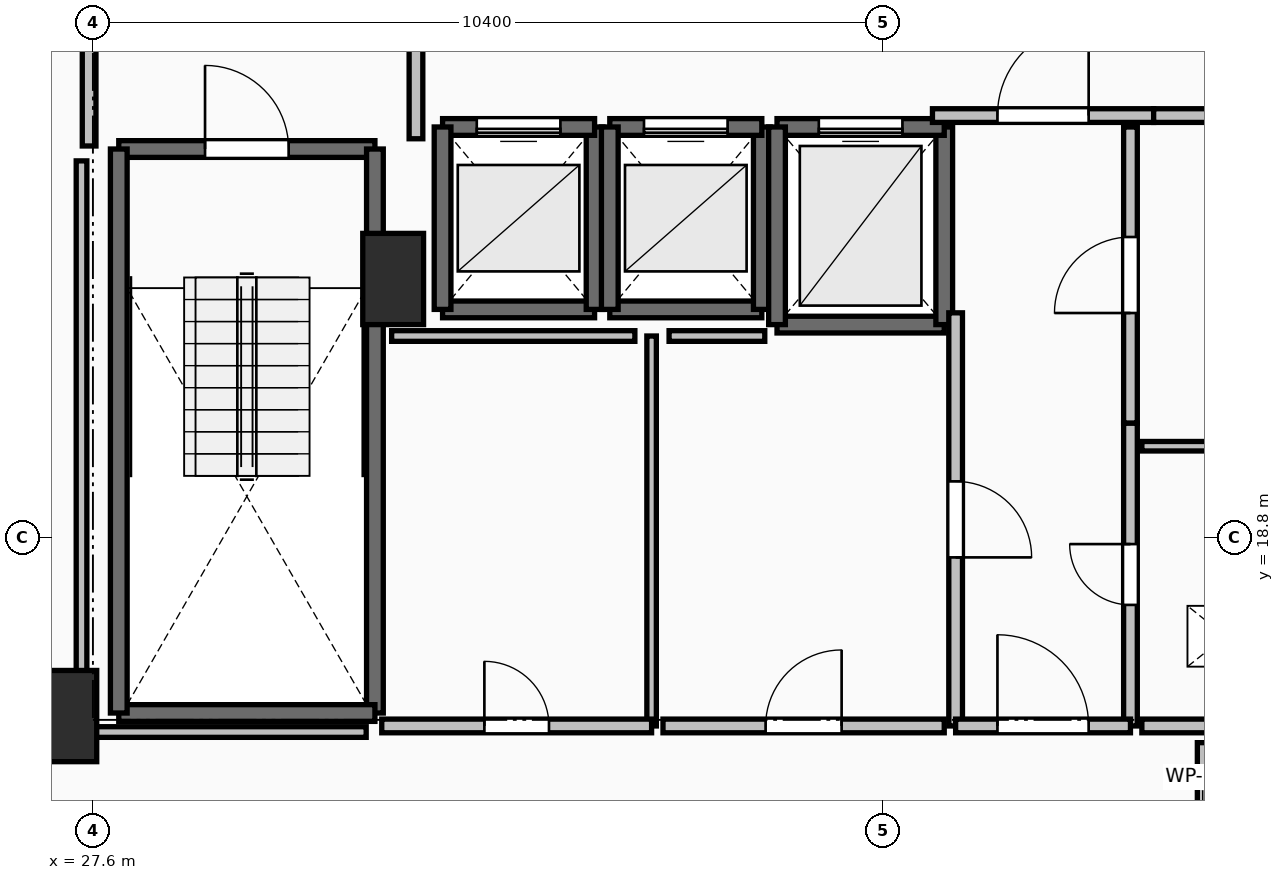
"""IFC4 building model, lengths in metres.
Left out: names, types, materials, properties, quantities, classifications, styles, units other than length and angle.
Written with IfcOpenShell. Run it as: python <this file> out.ifc"""

import sys

from ifc_helpers import new_model, si_unit, direction, frame, frame_2d, origin, origin_2d, place, context, subcontext, project, spatial, rectangle, extrude, element, fill, save


model = new_model("IFC4")
c1 = context("Model", 3, precision=1e-05, world=origin(), true_north=direction((0.0, 1.0)))
c2 = subcontext(c1, "Body", "Model", "MODEL_VIEW")
j1 = project(units=[si_unit("LENGTHUNIT", "METRE"), si_unit("PLANEANGLEUNIT", "RADIAN")], contexts=[c1])
p1 = place(None, origin())
s1 = spatial("IfcSite", under=j1, at=p1, CompositionType="ELEMENT")
p2 = place(p1, origin())
s2 = spatial("IfcBuilding", under=s1, at=p2, CompositionType="ELEMENT")
p3 = place(p2, frame((0.0, 0.0, 160.6)))
s3 = spatial("IfcBuildingStorey", under=s2, at=p3, CompositionType="ELEMENT", Elevation=160.6)
for number, where, z_axis, x_axis in (
    (1, (27.25, 16.45, 0.0), (0.0, 0.0, 1.0), (1.0, 0.0, 0.0)),
    (2, (31.55, 22.2, 0.0), (0.0, 0.0, 1.0), (1.0, 0.0, 0.0)),
):
    element("IfcColumn", number, at=place(p3, frame(where, z_axis=z_axis, x_axis=x_axis)), inside=s3, PredefinedType="PILASTER", context=c2, shape_type="SweptSolid", body=[
        extrude(rectangle(XDim=0.8, YDim=1.2, at=origin_2d()), origin(), (0.0, 0.0, 1.0), 3.5),
    ])
p4 = place(p3, frame((27.94, 23.91, 0.0), z_axis=(0.0, 0.0, 1.0), x_axis=(1.0, 0.0, 0.0)))
e3 = element("IfcWall", 3, at=p4, inside=s3, PredefinedType="SOLIDWALL", context=c2, shape_type="SweptSolid", body=[
    extrude(rectangle(XDim=3.37, YDim=0.22, at=frame_2d((1.685, 0.0))), origin(), (0.0, 0.0, 1.0), 3.24),
])
p5 = place(p4, frame((1.135, 0.0, 0.0)))
e4 = element("IfcOpeningElement", 4, at=p5, cuts=e3, PredefinedType="OPENING", context=c2, shape_type="SweptSolid", body=[
    extrude(rectangle(XDim=1.1, YDim=2.15, at=frame_2d((0.55, 1.075))), frame((0.0, 0.125, 0.0), z_axis=(0.0, -1.0, 0.0), x_axis=(1.0, 0.0, 0.0)), (0.0, 0.0, 1.0), 0.25),
])
p6 = place(p3, frame((31.31, 23.91, 0.0), z_axis=(0.0, 0.0, 1.0), x_axis=(0.0, -1.0, 0.0)))
e5 = element("IfcWall", 5, at=p6, inside=s3, PredefinedType="SOLIDWALL", context=c2, shape_type="SweptSolid", body=[
    extrude(rectangle(XDim=7.42, YDim=0.22, at=frame_2d((3.71, 0.0))), origin(), (0.0, 0.0, 1.0), 3.24),
])
p7 = place(p3, frame((31.31, 16.49, 0.0), z_axis=(0.0, 0.0, 1.0), x_axis=(-1.0, 0.0, 0.0)))
e6 = element("IfcWall", 6, at=p7, inside=s3, PredefinedType="SOLIDWALL", context=c2, shape_type="SweptSolid", body=[
    extrude(rectangle(XDim=3.37, YDim=0.22, at=frame_2d((1.685, 0.0))), origin(), (0.0, 0.0, 1.0), 3.24),
])
p8 = place(p3, frame((27.94, 16.49, 0.0), z_axis=(0.0, 0.0, 1.0), x_axis=(0.0, 1.0, 0.0)))
e7 = element("IfcWall", 7, at=p8, inside=s3, PredefinedType="SOLIDWALL", context=c2, shape_type="SweptSolid", body=[
    extrude(rectangle(XDim=7.42, YDim=0.22, at=frame_2d((3.71, 0.0))), origin(), (0.0, 0.0, 1.0), 3.24),
])
p9 = place(p3, frame((32.2, 21.8, 0.0), z_axis=(0.0, 0.0, 1.0), x_axis=(1.0, 0.0, 0.0)))
e8 = element("IfcWall", 8, at=p9, inside=s3, PredefinedType="SOLIDWALL", context=c2, shape_type="SweptSolid", body=[
    extrude(rectangle(XDim=2.0, YDim=0.22, at=frame_2d((1.0, 0.0))), origin(), (0.0, 0.0, 1.0), 3.24),
])
p10 = place(p3, frame((34.2, 21.8, 0.0), z_axis=(0.0, 0.0, 1.0), x_axis=(0.0, 1.0, 0.0)))
e9 = element("IfcWall", 9, at=p10, inside=s3, PredefinedType="SOLIDWALL", context=c2, shape_type="SweptSolid", body=[
    extrude(rectangle(XDim=2.4, YDim=0.22, at=frame_2d((1.2, 0.0))), origin(), (0.0, 0.0, 1.0), 3.24),
])
p11 = place(p3, frame((34.2, 24.2, 0.0), z_axis=(0.0, 0.0, 1.0), x_axis=(-1.0, 0.0, 0.0)))
e10 = element("IfcWall", 10, at=p11, inside=s3, PredefinedType="SOLIDWALL", context=c2, shape_type="SweptSolid", body=[
    extrude(rectangle(XDim=2.0, YDim=0.22, at=frame_2d((1.0, 0.0))), origin(), (0.0, 0.0, 1.0), 3.24),
])
p12 = place(p11, frame((0.45, 0.0, 0.0)))
e11 = element("IfcOpeningElement", 11, at=p12, cuts=e10, PredefinedType="OPENING", context=c2, shape_type="SweptSolid", body=[
    extrude(rectangle(XDim=1.1, YDim=2.2, at=frame_2d((0.55, 1.1))), frame((0.0, 0.125, 0.0), z_axis=(0.0, -1.0, 0.0), x_axis=(1.0, 0.0, 0.0)), (0.0, 0.0, 1.0), 0.25),
])
p13 = place(p3, frame((32.2, 24.2, 0.0), z_axis=(0.0, 0.0, 1.0), x_axis=(0.0, -1.0, 0.0)))
e12 = element("IfcWall", 12, at=p13, inside=s3, PredefinedType="SOLIDWALL", context=c2, shape_type="SweptSolid", body=[
    extrude(rectangle(XDim=2.4, YDim=0.22, at=frame_2d((1.2, 0.0))), origin(), (0.0, 0.0, 1.0), 3.24),
])
p14 = place(p3, frame((34.4, 21.8, 0.0), z_axis=(0.0, 0.0, 1.0), x_axis=(1.0, 0.0, 0.0)))
e13 = element("IfcWall", 13, at=p14, inside=s3, PredefinedType="SOLIDWALL", context=c2, shape_type="SweptSolid", body=[
    extrude(rectangle(XDim=2.0, YDim=0.22, at=frame_2d((1.0, 0.0))), origin(), (0.0, 0.0, 1.0), 3.24),
])
p15 = place(p3, frame((36.4, 21.8, 0.0), z_axis=(0.0, 0.0, 1.0), x_axis=(0.0, 1.0, 0.0)))
e14 = element("IfcWall", 14, at=p15, inside=s3, PredefinedType="SOLIDWALL", context=c2, shape_type="SweptSolid", body=[
    extrude(rectangle(XDim=2.4, YDim=0.22, at=frame_2d((1.2, 0.0))), origin(), (0.0, 0.0, 1.0), 3.24),
])
p16 = place(p3, frame((36.4, 24.2, 0.0), z_axis=(0.0, 0.0, 1.0), x_axis=(-1.0, 0.0, 0.0)))
e15 = element("IfcWall", 15, at=p16, inside=s3, PredefinedType="SOLIDWALL", context=c2, shape_type="SweptSolid", body=[
    extrude(rectangle(XDim=2.0, YDim=0.22, at=frame_2d((1.0, 0.0))), origin(), (0.0, 0.0, 1.0), 3.24),
])
p17 = place(p16, frame((0.45, 0.0, 0.0)))
e16 = element("IfcOpeningElement", 16, at=p17, cuts=e15, PredefinedType="OPENING", context=c2, shape_type="SweptSolid", body=[
    extrude(rectangle(XDim=1.1, YDim=2.2, at=frame_2d((0.55, 1.1))), frame((0.0, 0.125, 0.0), z_axis=(0.0, -1.0, 0.0), x_axis=(1.0, 0.0, 0.0)), (0.0, 0.0, 1.0), 0.25),
])
p18 = place(p3, frame((34.4, 24.2, 0.0), z_axis=(0.0, 0.0, 1.0), x_axis=(0.0, -1.0, 0.0)))
e17 = element("IfcWall", 17, at=p18, inside=s3, PredefinedType="SOLIDWALL", context=c2, shape_type="SweptSolid", body=[
    extrude(rectangle(XDim=2.4, YDim=0.22, at=frame_2d((1.2, 0.0))), origin(), (0.0, 0.0, 1.0), 3.24),
])
p19 = place(p3, frame((36.6, 21.6, 0.0), z_axis=(0.0, 0.0, 1.0), x_axis=(1.0, 0.0, 0.0)))
e18 = element("IfcWall", 18, at=p19, inside=s3, PredefinedType="SOLIDWALL", context=c2, shape_type="SweptSolid", body=[
    extrude(rectangle(XDim=2.2, YDim=0.22, at=frame_2d((1.1, 0.0))), origin(), (0.0, 0.0, 1.0), 3.24),
])
p20 = place(p3, frame((38.8, 21.6, 0.0), z_axis=(0.0, 0.0, 1.0), x_axis=(0.0, 1.0, 0.0)))
e19 = element("IfcWall", 19, at=p20, inside=s3, PredefinedType="SOLIDWALL", context=c2, shape_type="SweptSolid", body=[
    extrude(rectangle(XDim=2.6, YDim=0.22, at=frame_2d((1.3, 0.0))), origin(), (0.0, 0.0, 1.0), 3.24),
])
p21 = place(p3, frame((38.8, 24.2, 0.0), z_axis=(0.0, 0.0, 1.0), x_axis=(-1.0, 0.0, 0.0)))
e20 = element("IfcWall", 20, at=p21, inside=s3, PredefinedType="SOLIDWALL", context=c2, shape_type="SweptSolid", body=[
    extrude(rectangle(XDim=2.2, YDim=0.22, at=frame_2d((1.1, 0.0))), origin(), (0.0, 0.0, 1.0), 3.24),
])
p22 = place(p21, frame((0.55, 0.0, 0.0)))
e21 = element("IfcOpeningElement", 21, at=p22, cuts=e20, PredefinedType="OPENING", context=c2, shape_type="SweptSolid", body=[
    extrude(rectangle(XDim=1.1, YDim=2.2, at=frame_2d((0.55, 1.1))), frame((0.0, 0.125, 0.0), z_axis=(0.0, -1.0, 0.0), x_axis=(1.0, 0.0, 0.0)), (0.0, 0.0, 1.0), 0.25),
])
p23 = place(p3, frame((36.6, 24.2, 0.0), z_axis=(0.0, 0.0, 1.0), x_axis=(0.0, -1.0, 0.0)))
e22 = element("IfcWall", 22, at=p23, inside=s3, PredefinedType="SOLIDWALL", context=c2, shape_type="SweptSolid", body=[
    extrude(rectangle(XDim=2.6, YDim=0.22, at=frame_2d((1.3, 0.0))), origin(), (0.0, 0.0, 1.0), 3.24),
])
p24 = place(p3, frame((31.85, 24.045, 0.0), z_axis=(0.0, 0.0, 1.0), x_axis=(0.0, 1.0, 0.0)))
e23 = element("IfcWall", 23, at=p24, inside=s3, PredefinedType="PARTITIONING", context=c2, shape_type="SweptSolid", body=[
    extrude(rectangle(XDim=3.91, YDim=0.18, at=frame_2d((1.955, 0.0))), origin(), (0.0, 0.0, 1.0), 3.24),
])
p25 = place(p24, frame((1.355, 0.0, 0.0)))
e24 = element("IfcOpeningElement", 24, at=p25, cuts=e23, PredefinedType="OPENING", context=c2, shape_type="SweptSolid", body=[
    extrude(rectangle(XDim=1.2, YDim=2.15, at=frame_2d((0.6, 1.075))), frame((0.0, 0.105, 0.0), z_axis=(0.0, -1.0, 0.0), x_axis=(1.0, 0.0, 0.0)), (0.0, 0.0, 1.0), 0.21),
])
p26 = place(p3, frame((27.55, 28.0, 0.0), z_axis=(0.0, 0.0, 1.0), x_axis=(0.0, -1.0, 0.0)))
e25 = element("IfcWall", 25, at=p26, inside=s3, PredefinedType="PARTITIONING", context=c2, shape_type="SweptSolid", body=[
    extrude(rectangle(XDim=4.05, YDim=0.18, at=frame_2d((2.025, 0.0))), origin(), (0.0, 0.0, 1.0), 3.24),
])
p27 = place(p26, frame((1.425, 0.0, 0.0)))
e26 = element("IfcOpeningElement", 26, at=p27, cuts=e25, PredefinedType="OPENING", context=c2, shape_type="SweptSolid", body=[
    extrude(rectangle(XDim=1.2, YDim=2.15, at=frame_2d((0.6, 1.075))), frame((0.0, 0.105, 0.0), z_axis=(0.0, -1.0, 0.0), x_axis=(1.0, 0.0, 0.0)), (0.0, 0.0, 1.0), 0.21),
])
p28 = place(p3, frame((38.645, 24.35, 0.0), z_axis=(0.0, 0.0, 1.0), x_axis=(1.0, 0.0, 0.0)))
e27 = element("IfcWall", 27, at=p28, inside=s3, PredefinedType="PARTITIONING", context=c2, shape_type="SweptSolid", body=[
    extrude(rectangle(XDim=2.91, YDim=0.18, at=frame_2d((1.455, 0.0))), origin(), (0.0, 0.0, 1.0), 3.24),
])
p29 = place(p28, frame((0.855, 0.0, 0.0)))
e28 = element("IfcOpeningElement", 28, at=p29, cuts=e27, PredefinedType="OPENING", context=c2, shape_type="SweptSolid", body=[
    extrude(rectangle(XDim=1.2, YDim=2.15, at=frame_2d((0.6, 1.075))), frame((0.0, 0.105, 0.0), z_axis=(0.0, -1.0, 0.0), x_axis=(1.0, 0.0, 0.0)), (0.0, 0.0, 1.0), 0.21),
])
p30 = place(p3, frame((41.555, 24.35, 0.0), z_axis=(0.0, 0.0, 1.0), x_axis=(1.0, 0.0, 0.0)))
e29 = element("IfcWall", 29, at=p30, inside=s3, PredefinedType="PARTITIONING", context=c2, shape_type="SweptSolid", body=[
    extrude(rectangle(XDim=2.445, YDim=0.18, at=frame_2d((1.223, 0.0))), origin(), (0.0, 0.0, 1.0), 3.24),
])
p31 = place(p30, frame((0.722, 0.0, 0.0)))
e30 = element("IfcOpeningElement", 30, at=p31, cuts=e29, PredefinedType="OPENING", context=c2, shape_type="SweptSolid", body=[
    extrude(rectangle(XDim=1.0, YDim=2.15, at=frame_2d((0.5, 1.075))), frame((0.0, 0.105, 0.0), z_axis=(0.0, -1.0, 0.0), x_axis=(1.0, 0.0, 0.0)), (0.0, 0.0, 1.0), 0.21),
])
p32 = place(p3, frame((41.25, 16.32, 0.0), z_axis=(0.0, 0.0, 1.0), x_axis=(0.0, 1.0, 0.0)))
e31 = element("IfcWall", 31, at=p32, inside=s3, PredefinedType="PARTITIONING", context=c2, shape_type="SweptSolid", body=[
    extrude(rectangle(XDim=3.985, YDim=0.18, at=frame_2d((1.992, 0.0))), origin(), (0.0, 0.0, 1.0), 3.24),
])
p33 = place(p32, frame((1.593, 0.0, 0.0)))
e32 = element("IfcOpeningElement", 32, at=p33, cuts=e31, PredefinedType="OPENING", context=c2, shape_type="SweptSolid", body=[
    extrude(rectangle(XDim=0.8, YDim=2.05, at=frame_2d((0.4, 1.025))), frame((0.0, 0.105, 0.0), z_axis=(0.0, -1.0, 0.0), x_axis=(1.0, 0.0, 0.0)), (0.0, 0.0, 1.0), 0.21),
])
p34 = place(p3, frame((41.25, 20.305, 0.0), z_axis=(0.0, 0.0, 1.0), x_axis=(0.0, 1.0, 0.0)))
e33 = element("IfcWall", 33, at=p34, inside=s3, PredefinedType="PARTITIONING", context=c2, shape_type="SweptSolid", body=[
    extrude(rectangle(XDim=3.895, YDim=0.18, at=frame_2d((1.948, 0.0))), origin(), (0.0, 0.0, 1.0), 3.24),
])
p35 = place(p34, frame((1.448, 0.0, 0.0)))
e34 = element("IfcOpeningElement", 34, at=p35, cuts=e33, PredefinedType="OPENING", context=c2, shape_type="SweptSolid", body=[
    extrude(rectangle(XDim=1.0, YDim=2.15, at=frame_2d((0.5, 1.075))), frame((0.0, 0.105, 0.0), z_axis=(0.0, -1.0, 0.0), x_axis=(1.0, 0.0, 0.0)), (0.0, 0.0, 1.0), 0.21),
])
p36 = place(p3, frame((38.95, 21.755, 0.0), z_axis=(0.0, 0.0, 1.0), x_axis=(0.0, -1.0, 0.0)))
e35 = element("IfcWall", 35, at=p36, inside=s3, PredefinedType="PARTITIONING", context=c2, shape_type="SweptSolid", body=[
    extrude(rectangle(XDim=5.435, YDim=0.18, at=frame_2d((2.717, 0.0))), origin(), (0.0, 0.0, 1.0), 3.24),
])
p37 = place(p36, frame((2.218, 0.0, 0.0)))
e36 = element("IfcOpeningElement", 36, at=p37, cuts=e35, PredefinedType="OPENING", context=c2, shape_type="SweptSolid", body=[
    extrude(rectangle(XDim=1.0, YDim=2.15, at=frame_2d((0.5, 1.075))), frame((0.0, 0.105, 0.0), z_axis=(0.0, -1.0, 0.0), x_axis=(1.0, 0.0, 0.0)), (0.0, 0.0, 1.0), 0.21),
])
p38 = place(p3, frame((38.95, 16.32, 0.0), z_axis=(0.0, 0.0, 1.0), x_axis=(1.0, 0.0, 0.0)))
e37 = element("IfcWall", 37, at=p38, inside=s3, PredefinedType="PARTITIONING", context=c2, shape_type="SweptSolid", body=[
    extrude(rectangle(XDim=2.3, YDim=0.18, at=frame_2d((1.15, 0.0))), origin(), (0.0, 0.0, 1.0), 3.24),
])
p39 = place(p38, frame((0.55, 0.0, 0.0)))
e38 = element("IfcOpeningElement", 38, at=p39, cuts=e37, PredefinedType="OPENING", context=c2, shape_type="SweptSolid", body=[
    extrude(rectangle(XDim=1.2, YDim=2.15, at=frame_2d((0.6, 1.075))), frame((0.0, 0.105, 0.0), z_axis=(0.0, -1.0, 0.0), x_axis=(1.0, 0.0, 0.0)), (0.0, 0.0, 1.0), 0.21),
])
p40 = place(p3, frame((44.6, 20.0, 0.0), z_axis=(0.0, 0.0, 1.0), x_axis=(-1.0, 0.0, 0.0)))
e39 = element("IfcWall", 39, at=p40, inside=s3, PredefinedType="PARTITIONING", context=c2, shape_type="SweptSolid", body=[
    extrude(rectangle(XDim=3.2, YDim=0.125, at=frame_2d((1.6, 0.0))), origin(), (0.0, 0.0, 1.0), 3.24),
])
p41 = place(p3, frame((41.4, 16.32, 0.0), z_axis=(0.0, 0.0, 1.0), x_axis=(1.0, 0.0, 0.0)))
e40 = element("IfcWall", 40, at=p41, inside=s3, PredefinedType="PARTITIONING", context=c2, shape_type="SweptSolid", body=[
    extrude(rectangle(XDim=3.2, YDim=0.18, at=frame_2d((1.6, 0.0))), origin(), (0.0, 0.0, 1.0), 3.24),
])
p42 = place(p41, frame((1.2, 0.0, 0.0)))
e41 = element("IfcOpeningElement", 41, at=p42, cuts=e40, PredefinedType="OPENING", context=c2, shape_type="SweptSolid", body=[
    extrude(rectangle(XDim=0.8, YDim=2.05, at=frame_2d((0.4, 1.025))), frame((0.0, 0.105, 0.0), z_axis=(0.0, -1.0, 0.0), x_axis=(1.0, 0.0, 0.0)), (0.0, 0.0, 1.0), 0.21),
])
p43 = place(p3, frame((34.95, 16.32, 0.0), z_axis=(0.0, 0.0, 1.0), x_axis=(0.0, 1.0, 0.0)))
e42 = element("IfcWall", 42, at=p43, inside=s3, PredefinedType="PARTITIONING", context=c2, shape_type="SweptSolid", body=[
    extrude(rectangle(XDim=5.13, YDim=0.125, at=frame_2d((2.565, 0.0))), origin(), (0.0, 0.0, 1.0), 3.24),
])
p44 = place(p3, frame((31.4, 16.32, 0.0), z_axis=(0.0, 0.0, 1.0), x_axis=(1.0, 0.0, 0.0)))
e43 = element("IfcWall", 43, at=p44, inside=s3, PredefinedType="PARTITIONING", context=c2, shape_type="SweptSolid", body=[
    extrude(rectangle(XDim=3.55, YDim=0.18, at=frame_2d((1.775, 0.0))), origin(), (0.0, 0.0, 1.0), 3.24),
])
p45 = place(p44, frame((1.35, 0.0, 0.0)))
e44 = element("IfcOpeningElement", 44, at=p45, cuts=e43, PredefinedType="OPENING", context=c2, shape_type="SweptSolid", body=[
    extrude(rectangle(XDim=0.85, YDim=2.1, at=frame_2d((0.425, 1.05))), frame((0.0, 0.105, 0.0), z_axis=(0.0, -1.0, 0.0), x_axis=(1.0, 0.0, 0.0)), (0.0, 0.0, 1.0), 0.21),
])
p46 = place(p3, frame((35.1, 16.32, 0.0), z_axis=(0.0, 0.0, 1.0), x_axis=(1.0, 0.0, 0.0)))
e45 = element("IfcWall", 45, at=p46, inside=s3, PredefinedType="PARTITIONING", context=c2, shape_type="SweptSolid", body=[
    extrude(rectangle(XDim=3.7, YDim=0.18, at=frame_2d((1.85, 0.0))), origin(), (0.0, 0.0, 1.0), 3.24),
])
p47 = place(p46, frame((1.35, 0.0, 0.0)))
e46 = element("IfcOpeningElement", 46, at=p47, cuts=e45, PredefinedType="OPENING", context=c2, shape_type="SweptSolid", body=[
    extrude(rectangle(XDim=1.0, YDim=2.15, at=frame_2d((0.5, 1.075))), frame((0.0, 0.105, 0.0), z_axis=(0.0, -1.0, 0.0), x_axis=(1.0, 0.0, 0.0)), (0.0, 0.0, 1.0), 0.21),
])
p48 = place(p3, frame((34.73, 21.45, 0.0), z_axis=(0.0, 0.0, 1.0), x_axis=(-1.0, 0.0, 0.0)))
e47 = element("IfcWall", 47, at=p48, inside=s3, PredefinedType="PARTITIONING", context=c2, shape_type="SweptSolid", body=[
    extrude(rectangle(XDim=3.2, YDim=0.14, at=frame_2d((1.6, 0.0))), origin(), (0.0, 0.0, 1.0), 3.24),
])
p49 = place(p3, frame((36.439, 21.45, 0.0), z_axis=(0.0, 0.0, 1.0), x_axis=(-1.0, 0.0, 0.0)))
e48 = element("IfcWall", 48, at=p49, inside=s3, PredefinedType="PARTITIONING", context=c2, shape_type="SweptSolid", body=[
    extrude(rectangle(XDim=1.259, YDim=0.14, at=frame_2d((0.629, 0.0))), origin(), (0.0, 0.0, 1.0), 3.24),
])
p50 = place(p3, frame((27.45, 23.754, 0.0), z_axis=(0.0, 0.0, 1.0), x_axis=(0.0, -1.0, 0.0)))
e49 = element("IfcWall", 49, at=p50, inside=s3, PredefinedType="PARTITIONING", context=c2, shape_type="SweptSolid", body=[
    extrude(rectangle(XDim=7.514, YDim=0.14, at=frame_2d((3.757, 0.0))), origin(), (0.0, 0.0, 1.0), 2.432),
])
p51 = place(p3, frame((27.45, 16.24, 0.0), z_axis=(0.0, 0.0, 1.0), x_axis=(1.0, 0.0, 0.0)))
e50 = element("IfcWall", 50, at=p51, inside=s3, PredefinedType="PARTITIONING", context=c2, shape_type="SweptSolid", body=[
    extrude(rectangle(XDim=3.745, YDim=0.14, at=frame_2d((1.873, 0.0))), origin(), (0.0, 0.0, 1.0), 2.432),
])
p52 = place(p3, frame((42.2, 16.1, 0.0), z_axis=(0.0, 0.0, 1.0), x_axis=(0.0, -1.0, 0.0)))
e51 = element("IfcWall", 51, at=p52, inside=s3, PredefinedType="PARTITIONING", context=c2, shape_type="SweptSolid", body=[
    extrude(rectangle(XDim=1.83, YDim=0.14, at=frame_2d((0.915, 0.0))), origin(), (0.0, 0.0, 1.0), 3.24),
])
p53 = place(p5, origin())
e52 = element("IfcDoor", 52, at=p53, inside=s3, OperationType="SINGLE_SWING_LEFT", PredefinedType="DOOR", context=c2, shape_type="SweptSolid", body=[
    extrude(rectangle(XDim=1.1, YDim=2.15, at=frame_2d((0.55, 1.075))), frame((0.0, 0.025, 0.0), z_axis=(0.0, -1.0, 0.0), x_axis=(1.0, 0.0, 0.0)), (0.0, 0.0, 1.0), 0.05),
])
fill(e4, e52)
p54 = place(p12, origin())
e53 = element("IfcDoor", 53, at=p54, inside=s3, OperationType="SLIDING_TO_LEFT", PredefinedType="DOOR", context=c2, shape_type="SweptSolid", body=[
    extrude(rectangle(XDim=1.1, YDim=2.2, at=frame_2d((0.55, 1.1))), frame((0.0, 0.025, 0.0), z_axis=(0.0, -1.0, 0.0), x_axis=(1.0, 0.0, 0.0)), (0.0, 0.0, 1.0), 0.05),
])
fill(e11, e53)
p55 = place(p17, origin())
e54 = element("IfcDoor", 54, at=p55, inside=s3, OperationType="SLIDING_TO_LEFT", PredefinedType="DOOR", context=c2, shape_type="SweptSolid", body=[
    extrude(rectangle(XDim=1.1, YDim=2.2, at=frame_2d((0.55, 1.1))), frame((0.0, 0.025, 0.0), z_axis=(0.0, -1.0, 0.0), x_axis=(1.0, 0.0, 0.0)), (0.0, 0.0, 1.0), 0.05),
])
fill(e16, e54)
p56 = place(p22, origin())
e55 = element("IfcDoor", 55, at=p56, inside=s3, OperationType="SLIDING_TO_LEFT", PredefinedType="DOOR", context=c2, shape_type="SweptSolid", body=[
    extrude(rectangle(XDim=1.1, YDim=2.2, at=frame_2d((0.55, 1.1))), frame((0.0, 0.025, 0.0), z_axis=(0.0, -1.0, 0.0), x_axis=(1.0, 0.0, 0.0)), (0.0, 0.0, 1.0), 0.05),
])
fill(e21, e55)
p57 = place(p29, origin())
e56 = element("IfcDoor", 56, at=p57, inside=s3, OperationType="SINGLE_SWING_RIGHT", PredefinedType="DOOR", context=c2, shape_type="SweptSolid", body=[
    extrude(rectangle(XDim=1.2, YDim=2.15, at=frame_2d((0.6, 1.075))), frame((0.0, 0.025, 0.0), z_axis=(0.0, -1.0, 0.0), x_axis=(1.0, 0.0, 0.0)), (0.0, 0.0, 1.0), 0.05),
])
fill(e28, e56)
p58 = place(p33, origin())
e57 = element("IfcDoor", 57, at=p58, inside=s3, OperationType="SINGLE_SWING_RIGHT", PredefinedType="DOOR", context=c2, shape_type="SweptSolid", body=[
    extrude(rectangle(XDim=0.8, YDim=2.05, at=frame_2d((0.4, 1.025))), frame((0.0, 0.025, 0.0), z_axis=(0.0, -1.0, 0.0), x_axis=(1.0, 0.0, 0.0)), (0.0, 0.0, 1.0), 0.05),
])
fill(e32, e57)
p59 = place(p35, origin())
e58 = element("IfcDoor", 58, at=p59, inside=s3, OperationType="SINGLE_SWING_LEFT", PredefinedType="DOOR", context=c2, shape_type="SweptSolid", body=[
    extrude(rectangle(XDim=1.0, YDim=2.15, at=frame_2d((0.5, 1.075))), frame((0.0, 0.025, 0.0), z_axis=(0.0, -1.0, 0.0), x_axis=(1.0, 0.0, 0.0)), (0.0, 0.0, 1.0), 0.05),
])
fill(e34, e58)
p60 = place(p37, origin())
e59 = element("IfcDoor", 59, at=p60, inside=s3, OperationType="SINGLE_SWING_RIGHT", PredefinedType="DOOR", context=c2, shape_type="SweptSolid", body=[
    extrude(rectangle(XDim=1.0, YDim=2.15, at=frame_2d((0.5, 1.075))), frame((0.0, 0.025, 0.0), z_axis=(0.0, -1.0, 0.0), x_axis=(1.0, 0.0, 0.0)), (0.0, 0.0, 1.0), 0.05),
])
fill(e36, e59)
p61 = place(p39, origin())
e60 = element("IfcDoor", 60, at=p61, inside=s3, OperationType="SINGLE_SWING_LEFT", PredefinedType="DOOR", context=c2, shape_type="SweptSolid", body=[
    extrude(rectangle(XDim=1.2, YDim=2.15, at=frame_2d((0.6, 1.075))), frame((0.0, 0.025, 0.0), z_axis=(0.0, -1.0, 0.0), x_axis=(1.0, 0.0, 0.0)), (0.0, 0.0, 1.0), 0.05),
])
fill(e38, e60)
p62 = place(p45, origin())
e61 = element("IfcDoor", 61, at=p62, inside=s3, OperationType="SINGLE_SWING_LEFT", PredefinedType="DOOR", context=c2, shape_type="SweptSolid", body=[
    extrude(rectangle(XDim=0.85, YDim=2.1, at=frame_2d((0.425, 1.05))), frame((0.0, 0.025, 0.0), z_axis=(0.0, -1.0, 0.0), x_axis=(1.0, 0.0, 0.0)), (0.0, 0.0, 1.0), 0.05),
])
fill(e44, e61)
p63 = place(p47, origin())
e62 = element("IfcDoor", 62, at=p63, inside=s3, OperationType="SINGLE_SWING_RIGHT", PredefinedType="DOOR", context=c2, shape_type="SweptSolid", body=[
    extrude(rectangle(XDim=1.0, YDim=2.15, at=frame_2d((0.5, 1.075))), frame((0.0, 0.025, 0.0), z_axis=(0.0, -1.0, 0.0), x_axis=(1.0, 0.0, 0.0)), (0.0, 0.0, 1.0), 0.05),
])
fill(e46, e62)
save(model, sys.argv[1])
